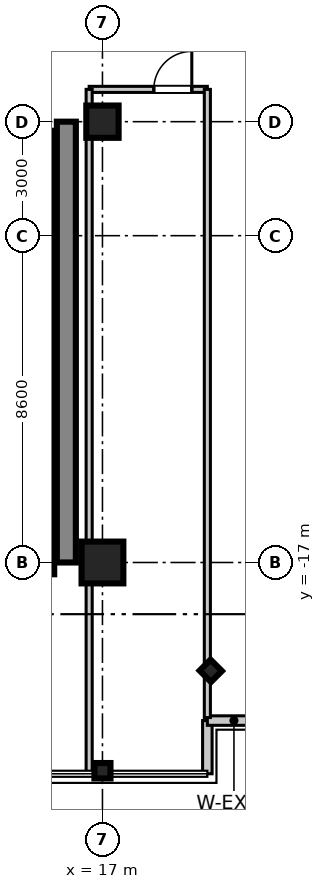
"""IFC4 building model, lengths in metres.
Left out: names, types, materials, properties, quantities, classifications, styles, units other than length and angle.
Written with IfcOpenShell. Run it as: python <this file> out.ifc"""

import sys

from ifc_helpers import new_model, si_unit, direction, frame, frame_2d, origin, origin_2d, place, context, subcontext, project, spatial, rectangle, i_section, extrude, source, transform, mapped, element, fill, save


model = new_model("IFC4")
c1 = context("Model", 3, precision=1e-05, world=origin(), true_north=direction((0.0, 1.0)))
c2 = subcontext(c1, "Body", "Model", "MODEL_VIEW")
j1 = project(units=[si_unit("LENGTHUNIT", "METRE"), si_unit("PLANEANGLEUNIT", "RADIAN")], contexts=[c1])
p1 = place(None, origin())
s1 = spatial("IfcSite", under=j1, at=p1, CompositionType="ELEMENT")
p2 = place(p1, origin())
s2 = spatial("IfcBuilding", under=s1, at=p2, CompositionType="ELEMENT")
p3 = place(p2, frame((0.0, 0.0, 185.5)))
s3 = spatial("IfcBuildingStorey", under=s2, at=p3, CompositionType="ELEMENT", Elevation=185.5)
m1 = source(origin(), c2, "Body", "SweptSolid", [
    extrude(rectangle(XDim=1.1, YDim=1.1, at=origin_2d()), origin(), (0.0, 0.0, 1.0), 3.605),
])
p4 = place(p3, frame((17.0, -17.0, 0.0), z_axis=(0.0, 0.0, 1.0), x_axis=(1.0, 0.0, 0.0)))
e1 = element("IfcColumn", 1, at=p4, inside=s3, PredefinedType="COLUMN", context=c2, shape_type="MappedRepresentation", body=[
    mapped(m1, transform((0.0, 0.0, 0.0), scale=1.0)),
])
m2 = source(origin(), c2, "Body", "SweptSolid", [
    extrude(rectangle(XDim=0.85, YDim=0.85, at=origin_2d()), origin(), (0.0, 0.0, 1.0), 3.605),
])
p5 = place(p3, frame((17.0, -5.4, 0.0), z_axis=(0.0, 0.0, 1.0), x_axis=(1.0, 0.0, 0.0)))
e2 = element("IfcColumn", 2, at=p5, inside=s3, PredefinedType="PILASTER", context=c2, shape_type="MappedRepresentation", body=[
    mapped(m2, transform((0.0, 0.0, 0.0), scale=1.0)),
])
m3 = source(origin(), c2, "Body", "SweptSolid", [
    extrude(i_section(OverallWidth=0.406, OverallDepth=0.422, WebThickness=0.019, FlangeThickness=0.03, at=origin_2d()), origin(), (0.0, 0.0, 1.0), 3.605),
])
for number, where, z_axis, x_axis in (
    (3, (17.0, -22.48, 0.0), (0.0, 0.0, 1.0), (0.0, 1.0, 0.0)),
    (4, (19.85, -19.85, 0.0), (0.0, 0.0, 1.0), (0.707, 0.707, 0.0)),
):
    element("IfcColumn", number, at=place(p3, frame(where, z_axis=z_axis, x_axis=x_axis)), inside=s3, PredefinedType="COLUMN", context=c2, shape_type="MappedRepresentation", body=[
        mapped(m3, transform((0.0, 0.0, 0.0), scale=1.0)),
    ])
m4 = source(origin(), c2, "Body", "SweptSolid", [
    extrude(rectangle(XDim=11.6, YDim=0.5, at=frame_2d((5.8, 0.0))), origin(), (0.0, 0.0, 1.0), 3.39),
])
p6 = place(p3, frame((16.05, -17.0, 0.0), z_axis=(0.0, 0.0, 1.0), x_axis=(0.0, 1.0, 0.0)))
e5 = element("IfcWall", 5, at=p6, inside=s3, PredefinedType="SHEAR", context=c2, shape_type="MappedRepresentation", body=[
    mapped(m4, transform((0.0, 0.0, 0.0), scale=1.0)),
])
m5 = source(origin(), c2, "Body", "SweptSolid", [
    extrude(rectangle(XDim=2.36, YDim=0.22, at=frame_2d((1.18, 0.0))), origin(), (0.0, 0.0, 1.0), 3.39),
])
p7 = place(p3, frame((15.62, -8.0, 0.0), z_axis=(0.0, 0.0, 1.0), x_axis=(0.0, 1.0, 0.0)))
e6 = element("IfcWall", 6, at=p7, inside=s3, PredefinedType="SHEAR", context=c2, shape_type="MappedRepresentation", body=[
    mapped(m5, transform((0.0, 0.0, 0.0), scale=1.0)),
])
m6 = source(origin(), c2, "Body", "SweptSolid", [
    extrude(rectangle(XDim=2.2, YDim=0.22, at=frame_2d((1.1, 0.0))), origin(), (0.0, 0.0, 1.0), 3.39),
])
for number, where, z_axis, x_axis in (
    (7, (15.62, -10.2, 0.0), (0.0, 0.0, 1.0), (0.0, 1.0, 0.0)),
    (8, (15.62, -12.4, 0.0), (0.0, 0.0, 1.0), (0.0, 1.0, 0.0)),
):
    element("IfcWall", number, at=place(p3, frame(where, z_axis=z_axis, x_axis=x_axis)), inside=s3, PredefinedType="SHEAR", context=c2, shape_type="MappedRepresentation", body=[
        mapped(m6, transform((0.0, 0.0, 0.0), scale=1.0)),
    ])
m7 = source(origin(), c2, "Body", "SweptSolid", [
    extrude(rectangle(XDim=2.3, YDim=0.22, at=frame_2d((1.15, 0.0))), origin(), (0.0, 0.0, 1.0), 3.39),
])
p8 = place(p3, frame((15.62, -14.7, 0.0), z_axis=(0.0, 0.0, 1.0), x_axis=(0.0, 1.0, 0.0)))
e9 = element("IfcWall", 9, at=p8, inside=s3, PredefinedType="SHEAR", context=c2, shape_type="MappedRepresentation", body=[
    mapped(m7, transform((0.0, 0.0, 0.0), scale=1.0)),
])
m8 = source(origin(), c2, "Body", "SweptSolid", [
    extrude(rectangle(XDim=2.61, YDim=0.22, at=frame_2d((1.305, 0.0))), origin(), (0.0, 0.0, 1.0), 3.39),
])
p9 = place(p3, frame((15.62, -17.31, 0.0), z_axis=(0.0, 0.0, 1.0), x_axis=(0.0, 1.0, 0.0)))
e10 = element("IfcWall", 10, at=p9, inside=s3, PredefinedType="SHEAR", context=c2, shape_type="MappedRepresentation", body=[
    mapped(m8, transform((0.0, 0.0, 0.0), scale=1.0)),
])
m9 = source(origin(), c2, "Body", "SweptSolid", [
    extrude(rectangle(XDim=1.4, YDim=0.25, at=frame_2d((0.7, 0.0))), origin(), (0.0, 0.0, 1.0), 3.39),
])
p10 = place(p3, frame((19.76, -22.56, 0.0), z_axis=(0.0, 0.0, 1.0), x_axis=(0.0, 1.0, 0.0)))
e11 = element("IfcWall", 11, at=p10, inside=s3, PredefinedType="STANDARD", context=c2, shape_type="MappedRepresentation", body=[
    mapped(m9, transform((0.0, 0.0, 0.0), scale=1.0)),
])
m10 = source(origin(), c2, "Body", "SweptSolid", [
    extrude(rectangle(XDim=1.4, YDim=0.25, at=frame_2d((0.7, 0.0))), origin(), (0.0, 0.0, 1.0), 3.39),
])
p11 = place(p3, frame((19.76, -21.16, 0.0), z_axis=(0.0, 0.0, 1.0), x_axis=(1.0, 0.0, 0.0)))
e12 = element("IfcWall", 12, at=p11, inside=s3, PredefinedType="STANDARD", context=c2, shape_type="MappedRepresentation", body=[
    mapped(m10, transform((0.0, 0.0, 0.0), scale=1.0)),
])
m11 = source(origin(), c2, "Body", "SweptSolid", [
    extrude(rectangle(XDim=3.11, YDim=0.16, at=frame_2d((1.555, 0.0))), origin(), (0.0, 0.0, 1.0), 2.73),
])
p12 = place(p3, frame((16.65, -4.55, 0.0), z_axis=(0.0, 0.0, 1.0), x_axis=(1.0, 0.0, 0.0)))
e13 = element("IfcWall", 13, at=p12, inside=s3, PredefinedType="PARTITIONING", context=c2, shape_type="MappedRepresentation", body=[
    mapped(m11, transform((0.0, 0.0, 0.0), scale=1.0)),
])
p13 = place(p12, frame((1.701, 0.0, 0.0)))
e14 = element("IfcOpeningElement", 14, at=p13, cuts=e13, PredefinedType="OPENING", context=c2, shape_type="SweptSolid", body=[
    extrude(rectangle(XDim=1.0, YDim=2.1, at=frame_2d((0.5, 1.05))), frame((0.0, 0.09, 0.0), z_axis=(0.0, -1.0, 0.0), x_axis=(1.0, 0.0, 0.0)), (0.0, 0.0, 1.0), 0.18),
])
m12 = source(origin(), c2, "Body", "SweptSolid", [
    extrude(rectangle(XDim=17.95, YDim=0.16, at=frame_2d((8.975, 0.0))), origin(), (0.0, 0.0, 1.0), 2.73),
])
p14 = place(p3, frame((16.65, -22.5, 0.0), z_axis=(0.0, 0.0, 1.0), x_axis=(0.0, 1.0, 0.0)))
e15 = element("IfcWall", 15, at=p14, inside=s3, PredefinedType="PARTITIONING", context=c2, shape_type="MappedRepresentation", body=[
    mapped(m12, transform((0.0, 0.0, 0.0), scale=1.0)),
])
m13 = source(origin(), c2, "Body", "SweptSolid", [
    extrude(rectangle(XDim=16.53, YDim=0.16, at=frame_2d((8.265, 0.0))), origin(), (0.0, 0.0, 1.0), 2.73),
])
p15 = place(p3, frame((19.76, -21.08, 0.0), z_axis=(0.0, 0.0, 1.0), x_axis=(0.0, 1.0, 0.0)))
e16 = element("IfcWall", 16, at=p15, inside=s3, PredefinedType="PARTITIONING", context=c2, shape_type="MappedRepresentation", body=[
    mapped(m13, transform((0.0, 0.0, 0.0), scale=1.0)),
])
m14 = source(origin(), c2, "Body", "SweptSolid", [
    extrude(rectangle(XDim=1.0, YDim=2.1, at=frame_2d((0.5, 1.05))), frame((0.0, 0.025, 0.0), z_axis=(0.0, -1.0, 0.0), x_axis=(1.0, 0.0, 0.0)), (0.0, 0.0, 1.0), 0.05),
])
p16 = place(p13, frame((1.0, 0.0, 0.0), z_axis=(0.0, 0.0, 1.0), x_axis=(-1.0, 0.0, 0.0)))
e17 = element("IfcDoor", 17, at=p16, inside=s3, OperationType="SINGLE_SWING_RIGHT", PredefinedType="DOOR", context=c2, shape_type="MappedRepresentation", body=[
    mapped(m14, transform((0.0, 0.0, 0.0), scale=1.0)),
])
fill(e14, e17)
save(model, sys.argv[1])
